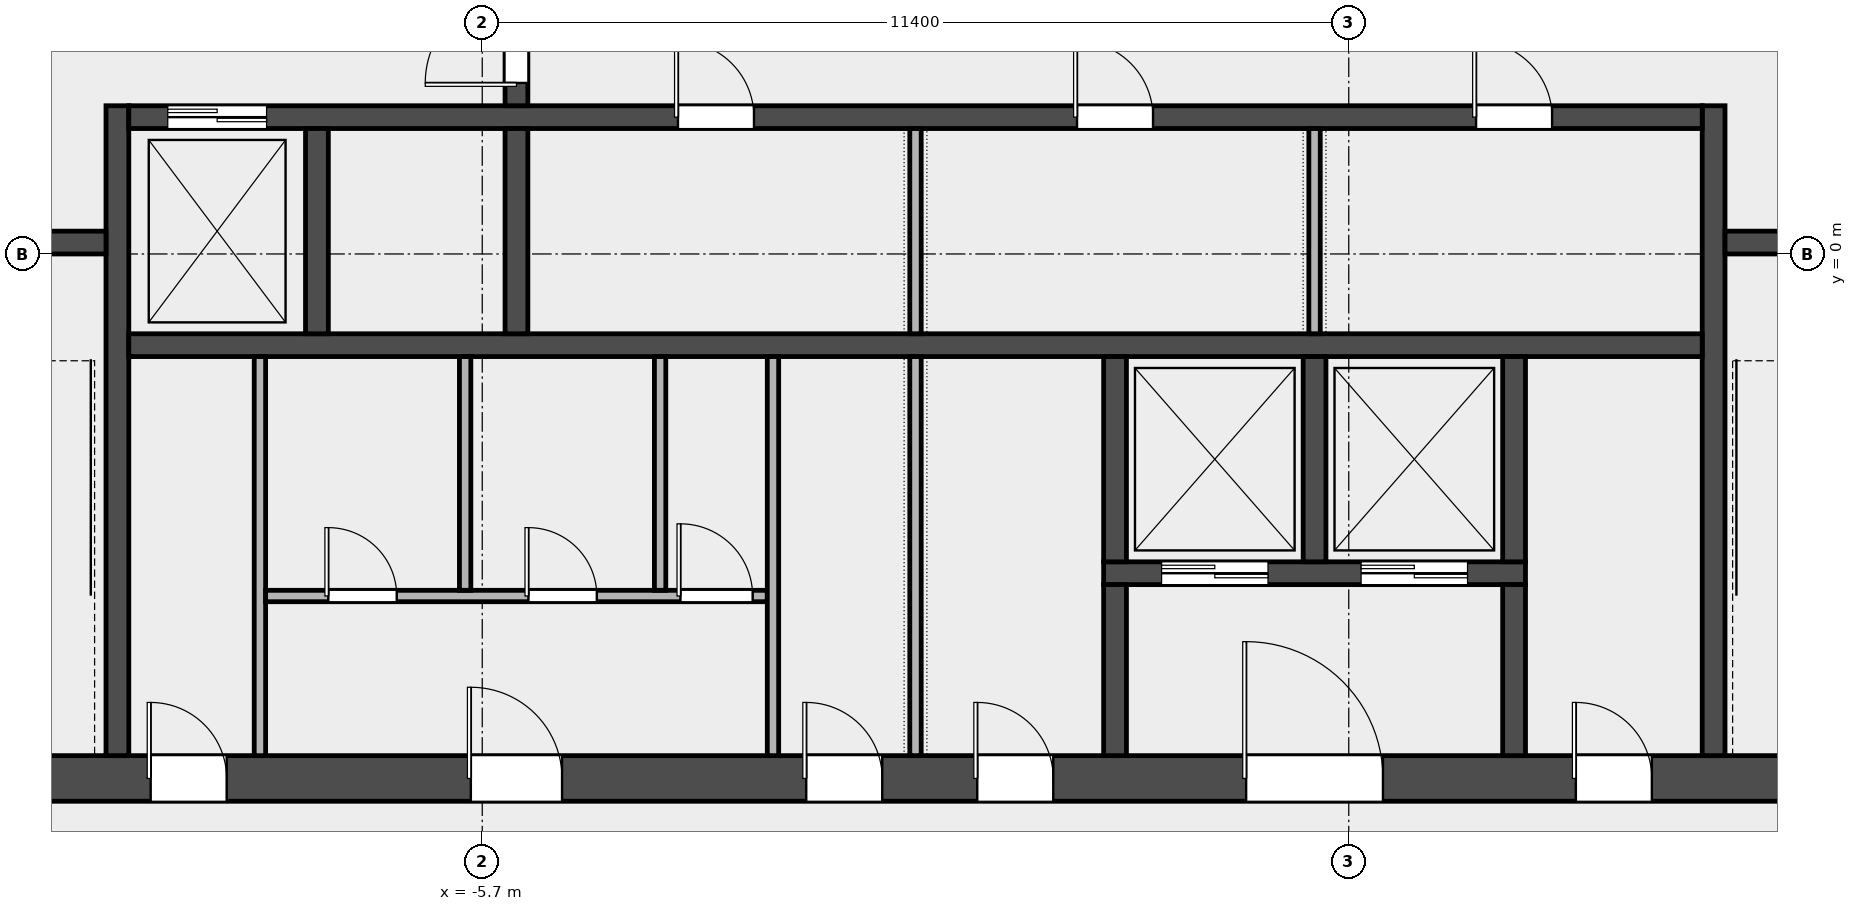
"""IFC4 building model, lengths in metres.
Left out: names, types, materials, properties, quantities, classifications, styles, units other than length and angle.
Written with IfcOpenShell. Run it as: python <this file> out.ifc"""

import sys

from ifc_helpers import new_model, si_unit, direction, frame, frame_2d, origin, place, context, subcontext, project, spatial, rectangle, extrude, element, fill, save


model = new_model("IFC4")
c1 = context("Model", 3, precision=1e-05, world=origin(), true_north=direction((0.0, 1.0)))
c2 = subcontext(c1, "Body", "Model", "MODEL_VIEW")
j1 = project(units=[si_unit("LENGTHUNIT", "METRE"), si_unit("PLANEANGLEUNIT", "RADIAN")], contexts=[c1])
p1 = place(None, origin())
s1 = spatial("IfcSite", under=j1, at=p1, CompositionType="ELEMENT")
p2 = place(p1, origin())
s2 = spatial("IfcBuilding", under=s1, at=p2, CompositionType="ELEMENT")
p3 = place(p2, frame((0.0, 0.0, 267.4)))
s3 = spatial("IfcBuildingStorey", under=s2, at=p3, CompositionType="ELEMENT", Elevation=267.4)
p4 = place(p3, frame((-14.4, -6.9, 0.0), z_axis=(0.0, 0.0, 1.0), x_axis=(1.0, 0.0, 0.0)))
e1 = element("IfcWall", 1, at=p4, inside=s3, PredefinedType="SHEAR", context=c2, shape_type="SweptSolid", body=[
    extrude(rectangle(XDim=28.8, YDim=0.6, at=frame_2d((14.4, 0.0))), origin(), (0.0, 0.0, 1.0), 3.7),
])
p5 = place(p4, frame((4.337, 0.0, 0.0)))
e2 = element("IfcOpeningElement", 2, at=p5, cuts=e1, PredefinedType="OPENING", context=c2, shape_type="SweptSolid", body=[
    extrude(rectangle(XDim=1.0, YDim=2.1, at=frame_2d((0.5, 1.05))), frame((0.0, 0.312, 0.0), z_axis=(0.0, -1.0, 0.0), x_axis=(1.0, 0.0, 0.0)), (0.0, 0.0, 1.0), 0.624),
])
p6 = place(p4, frame((8.55, 0.0, 0.0)))
e3 = element("IfcOpeningElement", 3, at=p6, cuts=e1, PredefinedType="OPENING", context=c2, shape_type="SweptSolid", body=[
    extrude(rectangle(XDim=1.2, YDim=2.1, at=frame_2d((0.6, 1.05))), frame((0.0, 0.312, 0.0), z_axis=(0.0, -1.0, 0.0), x_axis=(1.0, 0.0, 0.0)), (0.0, 0.0, 1.0), 0.624),
])
p7 = place(p4, frame((12.962, 0.0, 0.0)))
e4 = element("IfcOpeningElement", 4, at=p7, cuts=e1, PredefinedType="OPENING", context=c2, shape_type="SweptSolid", body=[
    extrude(rectangle(XDim=1.0, YDim=2.1, at=frame_2d((0.5, 1.05))), frame((0.0, 0.312, 0.0), z_axis=(0.0, -1.0, 0.0), x_axis=(1.0, 0.0, 0.0)), (0.0, 0.0, 1.0), 0.624),
])
p8 = place(p4, frame((15.212, 0.0, 0.0)))
e5 = element("IfcOpeningElement", 5, at=p8, cuts=e1, PredefinedType="OPENING", context=c2, shape_type="SweptSolid", body=[
    extrude(rectangle(XDim=1.0, YDim=2.1, at=frame_2d((0.5, 1.05))), frame((0.0, 0.312, 0.0), z_axis=(0.0, -1.0, 0.0), x_axis=(1.0, 0.0, 0.0)), (0.0, 0.0, 1.0), 0.624),
])
p9 = place(p4, frame((18.75, 0.0, 0.0)))
e6 = element("IfcOpeningElement", 6, at=p9, cuts=e1, PredefinedType="OPENING", context=c2, shape_type="SweptSolid", body=[
    extrude(rectangle(XDim=1.8, YDim=2.1, at=frame_2d((0.9, 1.05))), frame((0.0, 0.312, 0.0), z_axis=(0.0, -1.0, 0.0), x_axis=(1.0, 0.0, 0.0)), (0.0, 0.0, 1.0), 0.624),
])
p10 = place(p4, frame((23.087, 0.0, 0.0)))
e7 = element("IfcOpeningElement", 7, at=p10, cuts=e1, PredefinedType="OPENING", context=c2, shape_type="SweptSolid", body=[
    extrude(rectangle(XDim=1.0, YDim=2.1, at=frame_2d((0.5, 1.05))), frame((0.0, 0.312, 0.0), z_axis=(0.0, -1.0, 0.0), x_axis=(1.0, 0.0, 0.0)), (0.0, 0.0, 1.0), 0.624),
])
for number, where, z_axis, x_axis in (
    (8, (-10.5, -6.6, 0.0), (0.0, 0.0, 1.0), (0.0, 1.0, 0.0)),
    (9, (10.5, -6.6, 0.0), (0.0, 0.0, 1.0), (0.0, 1.0, 0.0)),
):
    element("IfcWall", number, at=place(p3, frame(where, z_axis=z_axis, x_axis=x_axis)), inside=s3, PredefinedType="SHEAR", context=c2, shape_type="SweptSolid", body=[
        extrude(rectangle(XDim=8.55, YDim=0.3, at=frame_2d((4.275, 0.0))), origin(), (0.0, 0.0, 1.0), 3.7),
    ])
p11 = place(p3, frame((-13.8, 0.15, 0.0), z_axis=(0.0, 0.0, 1.0), x_axis=(1.0, 0.0, 0.0)))
e10 = element("IfcWall", 10, at=p11, inside=s3, PredefinedType="SOLIDWALL", context=c2, shape_type="SweptSolid", body=[
    extrude(rectangle(XDim=3.15, YDim=0.3, at=frame_2d((1.575, 0.0))), origin(), (0.0, 0.0, 1.0), 3.7),
])
p12 = place(p11, frame((0.975, 0.0, 0.0)))
e11 = element("IfcOpeningElement", 11, at=p12, cuts=e10, PredefinedType="OPENING", context=c2, shape_type="SweptSolid", body=[
    extrude(rectangle(XDim=1.1, YDim=2.1, at=frame_2d((0.55, 1.05))), frame((0.0, 0.162, 0.0), z_axis=(0.0, -1.0, 0.0), x_axis=(1.0, 0.0, 0.0)), (0.0, 0.0, 1.0), 0.324),
])
p13 = place(p3, frame((10.65, 0.15, 0.0), z_axis=(0.0, 0.0, 1.0), x_axis=(1.0, 0.0, 0.0)))
e12 = element("IfcWall", 12, at=p13, inside=s3, PredefinedType="SOLIDWALL", context=c2, shape_type="SweptSolid", body=[
    extrude(rectangle(XDim=3.15, YDim=0.3, at=frame_2d((1.575, 0.0))), origin(), (0.0, 0.0, 1.0), 3.7),
])
p14 = place(p13, frame((1.025, 0.0, 0.0)))
e13 = element("IfcOpeningElement", 13, at=p14, cuts=e12, PredefinedType="OPENING", context=c2, shape_type="SweptSolid", body=[
    extrude(rectangle(XDim=1.1, YDim=2.1, at=frame_2d((0.55, 1.05))), frame((0.0, 0.162, 0.0), z_axis=(0.0, -1.0, 0.0), x_axis=(1.0, 0.0, 0.0)), (0.0, 0.0, 1.0), 0.324),
])
p15 = place(p3, frame((-10.35, -1.2, 0.0), z_axis=(0.0, 0.0, 1.0), x_axis=(1.0, 0.0, 0.0)))
e14 = element("IfcWall", 14, at=p15, inside=s3, PredefinedType="SOLIDWALL", context=c2, shape_type="SweptSolid", body=[
    extrude(rectangle(XDim=20.7, YDim=0.3, at=frame_2d((10.35, 0.0))), origin(), (0.0, 0.0, 1.0), 3.7),
])
p16 = place(p3, frame((-10.35, 1.8, 0.0), z_axis=(0.0, 0.0, 1.0), x_axis=(1.0, 0.0, 0.0)))
e15 = element("IfcWall", 15, at=p16, inside=s3, PredefinedType="SOLIDWALL", context=c2, shape_type="SweptSolid", body=[
    extrude(rectangle(XDim=20.7, YDim=0.3, at=frame_2d((10.35, 0.0))), origin(), (0.0, 0.0, 1.0), 3.7),
])
p17 = place(p16, frame((0.512, 0.0, 0.0)))
e16 = element("IfcOpeningElement", 16, at=p17, cuts=e15, PredefinedType="OPENING", context=c2, shape_type="SweptSolid", body=[
    extrude(rectangle(XDim=1.3, YDim=2.1, at=frame_2d((0.65, 1.05))), frame((0.0, 0.162, 0.0), z_axis=(0.0, -1.0, 0.0), x_axis=(1.0, 0.0, 0.0)), (0.0, 0.0, 1.0), 0.324),
])
p18 = place(p16, frame((7.225, 0.0, 0.0)))
e17 = element("IfcOpeningElement", 17, at=p18, cuts=e15, PredefinedType="OPENING", context=c2, shape_type="SweptSolid", body=[
    extrude(rectangle(XDim=1.0, YDim=2.1, at=frame_2d((0.5, 1.05))), frame((0.0, 0.162, 0.0), z_axis=(0.0, -1.0, 0.0), x_axis=(1.0, 0.0, 0.0)), (0.0, 0.0, 1.0), 0.324),
])
p19 = place(p16, frame((12.475, 0.0, 0.0)))
e18 = element("IfcOpeningElement", 18, at=p19, cuts=e15, PredefinedType="OPENING", context=c2, shape_type="SweptSolid", body=[
    extrude(rectangle(XDim=1.0, YDim=2.1, at=frame_2d((0.5, 1.05))), frame((0.0, 0.162, 0.0), z_axis=(0.0, -1.0, 0.0), x_axis=(1.0, 0.0, 0.0)), (0.0, 0.0, 1.0), 0.324),
])
p20 = place(p16, frame((17.725, 0.0, 0.0)))
e19 = element("IfcOpeningElement", 19, at=p20, cuts=e15, PredefinedType="OPENING", context=c2, shape_type="SweptSolid", body=[
    extrude(rectangle(XDim=1.0, YDim=2.1, at=frame_2d((0.5, 1.05))), frame((0.0, 0.162, 0.0), z_axis=(0.0, -1.0, 0.0), x_axis=(1.0, 0.0, 0.0)), (0.0, 0.0, 1.0), 0.324),
])
for number, where, z_axis, x_axis in (
    (20, (-7.875, -1.05, 0.0), (0.0, 0.0, 1.0), (0.0, 1.0, 0.0)),
    (21, (-5.25, -1.05, 0.0), (0.0, 0.0, 1.0), (0.0, 1.0, 0.0)),
):
    element("IfcWall", number, at=place(p3, frame(where, z_axis=z_axis, x_axis=x_axis)), inside=s3, PredefinedType="SOLIDWALL", context=c2, shape_type="SweptSolid", body=[
        extrude(rectangle(XDim=2.7, YDim=0.3, at=frame_2d((1.35, 0.0))), origin(), (0.0, 0.0, 1.0), 3.7),
    ])
p21 = place(p3, frame((-5.25, 1.95, 0.0), z_axis=(0.0, 0.0, 1.0), x_axis=(0.0, 1.0, 0.0)))
e22 = element("IfcWall", 22, at=p21, inside=s3, PredefinedType="SOLIDWALL", context=c2, shape_type="SweptSolid", body=[
    extrude(rectangle(XDim=3.3, YDim=0.3, at=frame_2d((1.65, 0.0))), origin(), (0.0, 0.0, 1.0), 3.7),
])
p22 = place(p21, frame((0.3, 0.0, 0.0)))
e23 = element("IfcOpeningElement", 23, at=p22, cuts=e22, PredefinedType="OPENING", context=c2, shape_type="SweptSolid", body=[
    extrude(rectangle(XDim=1.2, YDim=2.1, at=frame_2d((0.6, 1.05))), frame((0.0, 0.162, 0.0), z_axis=(0.0, -1.0, 0.0), x_axis=(1.0, 0.0, 0.0)), (0.0, 0.0, 1.0), 0.324),
])
p23 = place(p21, frame((1.8, 0.0, 0.0)))
e24 = element("IfcOpeningElement", 24, at=p23, cuts=e22, PredefinedType="OPENING", context=c2, shape_type="SweptSolid", body=[
    extrude(rectangle(XDim=1.2, YDim=2.1, at=frame_2d((0.6, 1.05))), frame((0.0, 0.162, 0.0), z_axis=(0.0, -1.0, 0.0), x_axis=(1.0, 0.0, 0.0)), (0.0, 0.0, 1.0), 0.324),
])
p24 = place(p3, frame((2.475, -4.2, 0.0), z_axis=(0.0, 0.0, 1.0), x_axis=(1.0, 0.0, 0.0)))
e25 = element("IfcWall", 25, at=p24, inside=s3, PredefinedType="SOLIDWALL", context=c2, shape_type="SweptSolid", body=[
    extrude(rectangle(XDim=5.55, YDim=0.3, at=frame_2d((2.775, 0.0))), origin(), (0.0, 0.0, 1.0), 3.7),
])
p25 = place(p24, frame((0.762, 0.0, 0.0)))
e26 = element("IfcOpeningElement", 26, at=p25, cuts=e25, PredefinedType="OPENING", context=c2, shape_type="SweptSolid", body=[
    extrude(rectangle(XDim=1.4, YDim=2.1, at=frame_2d((0.7, 1.05))), frame((0.0, 0.162, 0.0), z_axis=(0.0, -1.0, 0.0), x_axis=(1.0, 0.0, 0.0)), (0.0, 0.0, 1.0), 0.324),
])
p26 = place(p24, frame((3.387, 0.0, 0.0)))
e27 = element("IfcOpeningElement", 27, at=p26, cuts=e25, PredefinedType="OPENING", context=c2, shape_type="SweptSolid", body=[
    extrude(rectangle(XDim=1.4, YDim=2.1, at=frame_2d((0.7, 1.05))), frame((0.0, 0.162, 0.0), z_axis=(0.0, -1.0, 0.0), x_axis=(1.0, 0.0, 0.0)), (0.0, 0.0, 1.0), 0.324),
])
p27 = place(p3, frame((2.625, -4.05, 0.0), z_axis=(0.0, 0.0, 1.0), x_axis=(0.0, 1.0, 0.0)))
e28 = element("IfcWall", 28, at=p27, inside=s3, PredefinedType="SOLIDWALL", context=c2, shape_type="SweptSolid", body=[
    extrude(rectangle(XDim=2.7, YDim=0.3, at=frame_2d((1.35, 0.0))), origin(), (0.0, 0.0, 1.0), 3.7),
])
p28 = place(p3, frame((2.625, -6.6, 0.0), z_axis=(0.0, 0.0, 1.0), x_axis=(0.0, 1.0, 0.0)))
e29 = element("IfcWall", 29, at=p28, inside=s3, PredefinedType="SOLIDWALL", context=c2, shape_type="SweptSolid", body=[
    extrude(rectangle(XDim=2.25, YDim=0.3, at=frame_2d((1.125, 0.0))), origin(), (0.0, 0.0, 1.0), 3.7),
])
for number, where, z_axis, x_axis in (
    (30, (5.25, -4.05, 0.0), (0.0, 0.0, 1.0), (0.0, 1.0, 0.0)),
    (31, (7.875, -4.05, 0.0), (0.0, 0.0, 1.0), (0.0, 1.0, 0.0)),
):
    element("IfcWall", number, at=place(p3, frame(where, z_axis=z_axis, x_axis=x_axis)), inside=s3, PredefinedType="SOLIDWALL", context=c2, shape_type="SweptSolid", body=[
        extrude(rectangle(XDim=2.7, YDim=0.3, at=frame_2d((1.35, 0.0))), origin(), (0.0, 0.0, 1.0), 3.7),
    ])
p29 = place(p3, frame((7.875, -6.6, 0.0), z_axis=(0.0, 0.0, 1.0), x_axis=(0.0, 1.0, 0.0)))
e32 = element("IfcWall", 32, at=p29, inside=s3, PredefinedType="SOLIDWALL", context=c2, shape_type="SweptSolid", body=[
    extrude(rectangle(XDim=2.25, YDim=0.3, at=frame_2d((1.125, 0.0))), origin(), (0.0, 0.0, 1.0), 3.7),
])
p30 = place(p3, frame((-8.625, -6.6, 0.0), z_axis=(0.0, 0.0, 1.0), x_axis=(0.0, 1.0, 0.0)))
e33 = element("IfcWall", 33, at=p30, inside=s3, PredefinedType="PARTITIONING", context=c2, shape_type="SweptSolid", body=[
    extrude(rectangle(XDim=5.25, YDim=0.15, at=frame_2d((2.625, 0.0))), origin(), (0.0, 0.0, 1.0), 3.7),
])
p31 = place(p3, frame((-8.55, -4.5, 0.0), z_axis=(0.0, 0.0, 1.0), x_axis=(1.0, 0.0, 0.0)))
e34 = element("IfcWall", 34, at=p31, inside=s3, PredefinedType="PARTITIONING", context=c2, shape_type="SweptSolid", body=[
    extrude(rectangle(XDim=6.6, YDim=0.15, at=frame_2d((3.3, 0.0))), origin(), (0.0, 0.0, 1.0), 3.7),
])
p32 = place(p31, frame((0.825, 0.0, 0.0)))
e35 = element("IfcOpeningElement", 35, at=p32, cuts=e34, PredefinedType="OPENING", context=c2, shape_type="SweptSolid", body=[
    extrude(rectangle(XDim=0.9, YDim=2.1, at=frame_2d((0.45, 1.05))), frame((0.0, 0.087, 0.0), z_axis=(0.0, -1.0, 0.0), x_axis=(1.0, 0.0, 0.0)), (0.0, 0.0, 1.0), 0.174),
])
p33 = place(p31, frame((3.458, 0.0, 0.0)))
e36 = element("IfcOpeningElement", 36, at=p33, cuts=e34, PredefinedType="OPENING", context=c2, shape_type="SweptSolid", body=[
    extrude(rectangle(XDim=0.9, YDim=2.1, at=frame_2d((0.45, 1.05))), frame((0.0, 0.087, 0.0), z_axis=(0.0, -1.0, 0.0), x_axis=(1.0, 0.0, 0.0)), (0.0, 0.0, 1.0), 0.174),
])
p34 = place(p31, frame((5.458, 0.0, 0.0)))
e37 = element("IfcOpeningElement", 37, at=p34, cuts=e34, PredefinedType="OPENING", context=c2, shape_type="SweptSolid", body=[
    extrude(rectangle(XDim=0.95, YDim=2.1, at=frame_2d((0.475, 1.05))), frame((0.0, 0.087, 0.0), z_axis=(0.0, -1.0, 0.0), x_axis=(1.0, 0.0, 0.0)), (0.0, 0.0, 1.0), 0.174),
])
for number, where, z_axis, x_axis in (
    (38, (-5.925, -4.425, 0.0), (0.0, 0.0, 1.0), (0.0, 1.0, 0.0)),
    (39, (-3.36, -4.425, 0.0), (0.0, 0.0, 1.0), (0.0, 1.0, 0.0)),
):
    element("IfcWall", number, at=place(p3, frame(where, z_axis=z_axis, x_axis=x_axis)), inside=s3, PredefinedType="PARTITIONING", context=c2, shape_type="SweptSolid", body=[
        extrude(rectangle(XDim=3.075, YDim=0.15, at=frame_2d((1.538, 0.0))), origin(), (0.0, 0.0, 1.0), 3.7),
    ])
for number, where, z_axis, x_axis in (
    (40, (-1.875, -6.6, 0.0), (0.0, 0.0, 1.0), (0.0, 1.0, 0.0)),
    (41, (0.0, -6.6, 0.0), (0.0, 0.0, 1.0), (0.0, 1.0, 0.0)),
):
    element("IfcWall", number, at=place(p3, frame(where, z_axis=z_axis, x_axis=x_axis)), inside=s3, PredefinedType="PARTITIONING", context=c2, shape_type="SweptSolid", body=[
        extrude(rectangle(XDim=5.25, YDim=0.15, at=frame_2d((2.625, 0.0))), origin(), (0.0, 0.0, 1.0), 3.7),
    ])
for number, where, z_axis, x_axis in (
    (42, (0.0, -1.05, 0.0), (0.0, 0.0, 1.0), (0.0, 1.0, 0.0)),
    (43, (5.25, -1.05, 0.0), (0.0, 0.0, 1.0), (0.0, 1.0, 0.0)),
):
    element("IfcWall", number, at=place(p3, frame(where, z_axis=z_axis, x_axis=x_axis)), inside=s3, PredefinedType="PARTITIONING", context=c2, shape_type="SweptSolid", body=[
        extrude(rectangle(XDim=2.7, YDim=0.15, at=frame_2d((1.35, 0.0))), origin(), (0.0, 0.0, 1.0), 3.7),
    ])
p35 = place(p22, origin())
e44 = element("IfcDoor", 44, at=p35, inside=s3, OperationType="SINGLE_SWING_LEFT", PredefinedType="DOOR", context=c2, shape_type="SweptSolid", body=[
    extrude(rectangle(XDim=1.2, YDim=2.1, at=frame_2d((0.6, 1.05))), frame((0.0, 0.025, 0.0), z_axis=(0.0, -1.0, 0.0), x_axis=(1.0, 0.0, 0.0)), (0.0, 0.0, 1.0), 0.05),
])
fill(e23, e44)
p36 = place(p17, origin())
e45 = element("IfcDoor", 45, at=p36, inside=s3, OperationType="DOUBLE_DOOR_SLIDING", PredefinedType="DOOR", context=c2, shape_type="SweptSolid", body=[
    extrude(rectangle(XDim=1.3, YDim=2.1, at=frame_2d((0.65, 1.05))), frame((0.0, 0.025, 0.0), z_axis=(0.0, -1.0, 0.0), x_axis=(1.0, 0.0, 0.0)), (0.0, 0.0, 1.0), 0.05),
])
fill(e16, e45)
p37 = place(p25, origin())
e46 = element("IfcDoor", 46, at=p37, inside=s3, OperationType="DOUBLE_DOOR_SLIDING", PredefinedType="DOOR", context=c2, shape_type="SweptSolid", body=[
    extrude(rectangle(XDim=1.4, YDim=2.1, at=frame_2d((0.7, 1.05))), frame((0.0, 0.025, 0.0), z_axis=(0.0, -1.0, 0.0), x_axis=(1.0, 0.0, 0.0)), (0.0, 0.0, 1.0), 0.05),
])
fill(e26, e46)
p38 = place(p26, origin())
e47 = element("IfcDoor", 47, at=p38, inside=s3, OperationType="DOUBLE_DOOR_SLIDING", PredefinedType="DOOR", context=c2, shape_type="SweptSolid", body=[
    extrude(rectangle(XDim=1.4, YDim=2.1, at=frame_2d((0.7, 1.05))), frame((0.0, 0.025, 0.0), z_axis=(0.0, -1.0, 0.0), x_axis=(1.0, 0.0, 0.0)), (0.0, 0.0, 1.0), 0.05),
])
fill(e27, e47)
p39 = place(p5, origin())
e48 = element("IfcDoor", 48, at=p39, inside=s3, OperationType="SINGLE_SWING_LEFT", PredefinedType="DOOR", context=c2, shape_type="SweptSolid", body=[
    extrude(rectangle(XDim=1.0, YDim=2.1, at=frame_2d((0.5, 1.05))), frame((0.0, 0.025, 0.0), z_axis=(0.0, -1.0, 0.0), x_axis=(1.0, 0.0, 0.0)), (0.0, 0.0, 1.0), 0.05),
])
fill(e2, e48)
p40 = place(p6, origin())
e49 = element("IfcDoor", 49, at=p40, inside=s3, OperationType="SINGLE_SWING_LEFT", PredefinedType="DOOR", context=c2, shape_type="SweptSolid", body=[
    extrude(rectangle(XDim=1.2, YDim=2.1, at=frame_2d((0.6, 1.05))), frame((0.0, 0.025, 0.0), z_axis=(0.0, -1.0, 0.0), x_axis=(1.0, 0.0, 0.0)), (0.0, 0.0, 1.0), 0.05),
])
fill(e3, e49)
p41 = place(p32, origin())
e50 = element("IfcDoor", 50, at=p41, inside=s3, OperationType="SINGLE_SWING_LEFT", PredefinedType="DOOR", context=c2, shape_type="SweptSolid", body=[
    extrude(rectangle(XDim=0.9, YDim=2.1, at=frame_2d((0.45, 1.05))), frame((0.0, 0.025, 0.0), z_axis=(0.0, -1.0, 0.0), x_axis=(1.0, 0.0, 0.0)), (0.0, 0.0, 1.0), 0.05),
])
fill(e35, e50)
p42 = place(p33, origin())
e51 = element("IfcDoor", 51, at=p42, inside=s3, OperationType="SINGLE_SWING_LEFT", PredefinedType="DOOR", context=c2, shape_type="SweptSolid", body=[
    extrude(rectangle(XDim=0.9, YDim=2.1, at=frame_2d((0.45, 1.05))), frame((0.0, 0.025, 0.0), z_axis=(0.0, -1.0, 0.0), x_axis=(1.0, 0.0, 0.0)), (0.0, 0.0, 1.0), 0.05),
])
fill(e36, e51)
p43 = place(p34, origin())
e52 = element("IfcDoor", 52, at=p43, inside=s3, OperationType="SINGLE_SWING_LEFT", PredefinedType="DOOR", context=c2, shape_type="SweptSolid", body=[
    extrude(rectangle(XDim=0.95, YDim=2.1, at=frame_2d((0.475, 1.05))), frame((0.0, 0.025, 0.0), z_axis=(0.0, -1.0, 0.0), x_axis=(1.0, 0.0, 0.0)), (0.0, 0.0, 1.0), 0.05),
])
fill(e37, e52)
p44 = place(p7, origin())
e53 = element("IfcDoor", 53, at=p44, inside=s3, OperationType="SINGLE_SWING_LEFT", PredefinedType="DOOR", context=c2, shape_type="SweptSolid", body=[
    extrude(rectangle(XDim=1.0, YDim=2.1, at=frame_2d((0.5, 1.05))), frame((0.0, 0.025, 0.0), z_axis=(0.0, -1.0, 0.0), x_axis=(1.0, 0.0, 0.0)), (0.0, 0.0, 1.0), 0.05),
])
fill(e4, e53)
p45 = place(p8, origin())
e54 = element("IfcDoor", 54, at=p45, inside=s3, OperationType="SINGLE_SWING_LEFT", PredefinedType="DOOR", context=c2, shape_type="SweptSolid", body=[
    extrude(rectangle(XDim=1.0, YDim=2.1, at=frame_2d((0.5, 1.05))), frame((0.0, 0.025, 0.0), z_axis=(0.0, -1.0, 0.0), x_axis=(1.0, 0.0, 0.0)), (0.0, 0.0, 1.0), 0.05),
])
fill(e5, e54)
p46 = place(p9, origin())
e55 = element("IfcDoor", 55, at=p46, inside=s3, OperationType="DOUBLE_DOOR_SINGLE_SWING", PredefinedType="DOOR", context=c2, shape_type="SweptSolid", body=[
    extrude(rectangle(XDim=1.8, YDim=2.1, at=frame_2d((0.9, 1.05))), frame((0.0, 0.025, 0.0), z_axis=(0.0, -1.0, 0.0), x_axis=(1.0, 0.0, 0.0)), (0.0, 0.0, 1.0), 0.05),
])
fill(e6, e55)
p47 = place(p10, origin())
e56 = element("IfcDoor", 56, at=p47, inside=s3, OperationType="SINGLE_SWING_LEFT", PredefinedType="DOOR", context=c2, shape_type="SweptSolid", body=[
    extrude(rectangle(XDim=1.0, YDim=2.1, at=frame_2d((0.5, 1.05))), frame((0.0, 0.025, 0.0), z_axis=(0.0, -1.0, 0.0), x_axis=(1.0, 0.0, 0.0)), (0.0, 0.0, 1.0), 0.05),
])
fill(e7, e56)
p48 = place(p18, origin())
e57 = element("IfcDoor", 57, at=p48, inside=s3, OperationType="SINGLE_SWING_LEFT", PredefinedType="DOOR", context=c2, shape_type="SweptSolid", body=[
    extrude(rectangle(XDim=1.0, YDim=2.1, at=frame_2d((0.5, 1.05))), frame((0.0, 0.025, 0.0), z_axis=(0.0, -1.0, 0.0), x_axis=(1.0, 0.0, 0.0)), (0.0, 0.0, 1.0), 0.05),
])
fill(e17, e57)
p49 = place(p19, origin())
e58 = element("IfcDoor", 58, at=p49, inside=s3, OperationType="SINGLE_SWING_LEFT", PredefinedType="DOOR", context=c2, shape_type="SweptSolid", body=[
    extrude(rectangle(XDim=1.0, YDim=2.1, at=frame_2d((0.5, 1.05))), frame((0.0, 0.025, 0.0), z_axis=(0.0, -1.0, 0.0), x_axis=(1.0, 0.0, 0.0)), (0.0, 0.0, 1.0), 0.05),
])
fill(e18, e58)
p50 = place(p20, origin())
e59 = element("IfcDoor", 59, at=p50, inside=s3, OperationType="SINGLE_SWING_LEFT", PredefinedType="DOOR", context=c2, shape_type="SweptSolid", body=[
    extrude(rectangle(XDim=1.0, YDim=2.1, at=frame_2d((0.5, 1.05))), frame((0.0, 0.025, 0.0), z_axis=(0.0, -1.0, 0.0), x_axis=(1.0, 0.0, 0.0)), (0.0, 0.0, 1.0), 0.05),
])
fill(e19, e59)
save(model, sys.argv[1])
